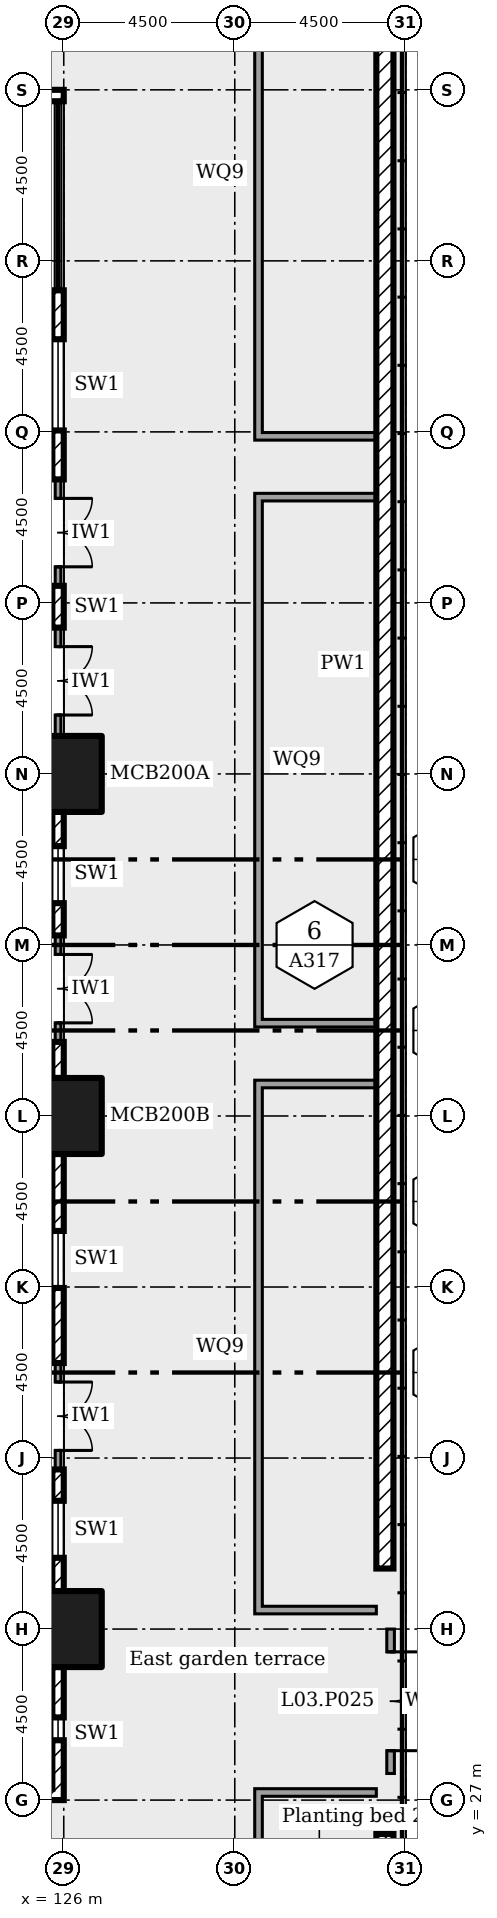
"""IFC4 building model, lengths in metres.
Left out: names, types, materials, properties, quantities, classifications, styles, units other than length and angle.
Written with IfcOpenShell. Run it as: python <this file> out.ifc"""

import sys

from ifc_helpers import new_model, si_unit, direction, frame, frame_2d, origin, origin_2d, place, context, subcontext, project, spatial, rectangle, extrude, element, fill, save


model = new_model("IFC4")
c1 = context("Model", 3, precision=1e-05, world=origin(), true_north=direction((0.0, 1.0)))
c2 = subcontext(c1, "Body", "Model", "MODEL_VIEW")
j1 = project(units=[si_unit("LENGTHUNIT", "METRE"), si_unit("PLANEANGLEUNIT", "RADIAN")], contexts=[c1])
p1 = place(None, origin())
s1 = spatial("IfcSite", under=j1, at=p1, CompositionType="ELEMENT")
p2 = place(p1, origin())
s2 = spatial("IfcBuilding", under=s1, at=p2, CompositionType="ELEMENT")
p3 = place(p2, frame((0.0, 0.0, 16.5)))
s3 = spatial("IfcBuildingStorey", under=s2, at=p3, CompositionType="ELEMENT", Elevation=16.5)
for number, where in (
    (1, (126.0, 31.5, 0.0)),
    (2, (126.0, 45.0, 0.0)),
    (3, (126.0, 54.0, 0.0)),
):
    element("IfcColumn", number, at=place(p3, frame(where)), inside=s3, PredefinedType="COLUMN", context=c2, shape_type="SweptSolid", body=[
        extrude(rectangle(XDim=2.0, YDim=2.0, at=origin_2d()), origin(), (0.0, 0.0, 1.0), 4.5),
    ])
p4 = place(p3, frame((122.5, 27.15, 0.0)))
e4 = element("IfcWall", 4, at=p4, inside=s3, PredefinedType="ELEMENTEDWALL", context=c2, shape_type="SweptSolid", body=[
    extrude(rectangle(XDim=3.2, YDim=0.3, at=frame_2d((1.6, 0.0))), origin(), (0.0, 0.0, 1.0), 4.05),
])
p5 = place(p4, frame((1.475, 0.0, 0.45)))
e5 = element("IfcOpeningElement", 5, at=p5, cuts=e4, PredefinedType="OPENING", context=c2, shape_type="SweptSolid", body=[
    extrude(rectangle(XDim=0.6, YDim=2.4, at=frame_2d((0.3, 1.2))), frame((0.0, 0.16, 0.0), z_axis=(0.0, -1.0, 0.0), x_axis=(1.0, 0.0, 0.0)), (0.0, 0.0, 1.0), 0.32),
])
p6 = place(p3, frame((125.85, 27.0, 0.0), z_axis=(0.0, 0.0, 1.0), x_axis=(0.0, 1.0, 0.0)))
e6 = element("IfcWall", 6, at=p6, inside=s3, PredefinedType="ELEMENTEDWALL", context=c2, shape_type="SweptSolid", body=[
    extrude(rectangle(XDim=3.5, YDim=0.3, at=frame_2d((1.75, 0.0))), origin(), (0.0, 0.0, 1.0), 4.05),
])
p7 = place(p6, frame((1.575, 0.0, 0.45)))
e7 = element("IfcOpeningElement", 7, at=p7, cuts=e6, PredefinedType="OPENING", context=c2, shape_type="SweptSolid", body=[
    extrude(rectangle(XDim=0.6, YDim=2.4, at=frame_2d((0.3, 1.2))), frame((0.0, 0.16, 0.0), z_axis=(0.0, -1.0, 0.0), x_axis=(1.0, 0.0, 0.0)), (0.0, 0.0, 1.0), 0.32),
])
p8 = place(p3, frame((125.85, 32.5, 0.0), z_axis=(0.0, 0.0, 1.0), x_axis=(0.0, 1.0, 0.0)))
e8 = element("IfcWall", 8, at=p8, inside=s3, PredefinedType="ELEMENTEDWALL", context=c2, shape_type="SweptSolid", body=[
    extrude(rectangle(XDim=3.2, YDim=0.3, at=frame_2d((1.6, 0.0))), origin(), (0.0, 0.0, 1.0), 2.25),
])
p9 = place(p8, frame((0.875, 0.0, 0.9)))
e9 = element("IfcOpeningElement", 9, at=p9, cuts=e8, PredefinedType="OPENING", context=c2, shape_type="SweptSolid", body=[
    extrude(rectangle(XDim=1.5, YDim=1.25, at=frame_2d((0.75, 0.625))), frame((0.0, 0.16, 0.0), z_axis=(0.0, -1.0, 0.0), x_axis=(1.0, 0.0, 0.0)), (0.0, 0.0, 1.0), 0.32),
])
p10 = place(p3, frame((125.85, 35.7, 0.0), z_axis=(0.0, 0.0, 1.0), x_axis=(0.0, 1.0, 0.0)))
e10 = element("IfcWall", 10, at=p10, inside=s3, PredefinedType="SOLIDWALL", context=c2, shape_type="SweptSolid", body=[
    extrude(rectangle(XDim=2.8, YDim=0.15, at=frame_2d((1.4, 0.0))), origin(), (0.0, 0.0, 1.0), 2.25),
])
p11 = place(p10, frame((0.5, 0.0, 0.0)))
e11 = element("IfcOpeningElement", 11, at=p11, cuts=e10, PredefinedType="OPENING", context=c2, shape_type="SweptSolid", body=[
    extrude(rectangle(XDim=1.8, YDim=2.1, at=frame_2d((0.9, 1.05))), frame((0.0, 0.085, 0.0), z_axis=(0.0, -1.0, 0.0), x_axis=(1.0, 0.0, 0.0)), (0.0, 0.0, 1.0), 0.17),
])
p12 = place(p3, frame((125.85, 38.5, 0.0), z_axis=(0.0, 0.0, 1.0), x_axis=(0.0, 1.0, 0.0)))
e12 = element("IfcWall", 12, at=p12, inside=s3, PredefinedType="ELEMENTEDWALL", context=c2, shape_type="SweptSolid", body=[
    extrude(rectangle(XDim=5.5, YDim=0.3, at=frame_2d((2.75, 0.0))), origin(), (0.0, 0.0, 1.0), 2.25),
])
p13 = place(p12, frame((1.975, 0.0, 0.9)))
e13 = element("IfcOpeningElement", 13, at=p13, cuts=e12, PredefinedType="OPENING", context=c2, shape_type="SweptSolid", body=[
    extrude(rectangle(XDim=1.5, YDim=1.25, at=frame_2d((0.75, 0.625))), frame((0.0, 0.16, 0.0), z_axis=(0.0, -1.0, 0.0), x_axis=(1.0, 0.0, 0.0)), (0.0, 0.0, 1.0), 0.32),
])
p14 = place(p3, frame((125.85, 46.0, 0.0), z_axis=(0.0, 0.0, 1.0), x_axis=(0.0, 1.0, 0.0)))
e14 = element("IfcWall", 14, at=p14, inside=s3, PredefinedType="ELEMENTEDWALL", context=c2, shape_type="SweptSolid", body=[
    extrude(rectangle(XDim=0.95, YDim=0.3, at=frame_2d((0.475, 0.0))), origin(), (0.0, 0.0, 1.0), 2.25),
])
p15 = place(p3, frame((125.85, 46.95, 0.0), z_axis=(0.0, 0.0, 1.0), x_axis=(0.0, 1.0, 0.0)))
e15 = element("IfcWall", 15, at=p15, inside=s3, PredefinedType="SOLIDWALL", context=c2, shape_type="SweptSolid", body=[
    extrude(rectangle(XDim=2.8, YDim=0.15, at=frame_2d((1.4, 0.0))), origin(), (0.0, 0.0, 1.0), 2.25),
])
p16 = place(p15, frame((0.5, 0.0, 0.0)))
e16 = element("IfcOpeningElement", 16, at=p16, cuts=e15, PredefinedType="OPENING", context=c2, shape_type="SweptSolid", body=[
    extrude(rectangle(XDim=1.8, YDim=2.1, at=frame_2d((0.9, 1.05))), frame((0.0, 0.085, 0.0), z_axis=(0.0, -1.0, 0.0), x_axis=(1.0, 0.0, 0.0)), (0.0, 0.0, 1.0), 0.17),
])
p17 = place(p3, frame((125.85, 49.75, 0.0), z_axis=(0.0, 0.0, 1.0), x_axis=(0.0, 1.0, 0.0)))
e17 = element("IfcWall", 17, at=p17, inside=s3, PredefinedType="ELEMENTEDWALL", context=c2, shape_type="SweptSolid", body=[
    extrude(rectangle(XDim=3.25, YDim=0.3, at=frame_2d((1.625, 0.0))), origin(), (0.0, 0.0, 1.0), 2.25),
])
p18 = place(p17, frame((0.85, 0.0, 0.9)))
e18 = element("IfcOpeningElement", 18, at=p18, cuts=e17, PredefinedType="OPENING", context=c2, shape_type="SweptSolid", body=[
    extrude(rectangle(XDim=1.5, YDim=1.25, at=frame_2d((0.75, 0.625))), frame((0.0, 0.16, 0.0), z_axis=(0.0, -1.0, 0.0), x_axis=(1.0, 0.0, 0.0)), (0.0, 0.0, 1.0), 0.32),
])
p19 = place(p3, frame((125.85, 55.0, 0.0), z_axis=(0.0, 0.0, 1.0), x_axis=(0.0, 1.0, 0.0)))
e19 = element("IfcWall", 19, at=p19, inside=s3, PredefinedType="SOLIDWALL", context=c2, shape_type="SweptSolid", body=[
    extrude(rectangle(XDim=2.85, YDim=0.15, at=frame_2d((1.425, 0.0))), origin(), (0.0, 0.0, 1.0), 4.05),
])
p20 = place(p19, frame((0.55, 0.0, 0.0)))
e20 = element("IfcOpeningElement", 20, at=p20, cuts=e19, PredefinedType="OPENING", context=c2, shape_type="SweptSolid", body=[
    extrude(rectangle(XDim=1.8, YDim=2.4, at=frame_2d((0.9, 1.2))), frame((0.0, 0.085, 0.0), z_axis=(0.0, -1.0, 0.0), x_axis=(1.0, 0.0, 0.0)), (0.0, 0.0, 1.0), 0.17),
])
p21 = place(p3, frame((125.85, 57.85, 0.0), z_axis=(0.0, 0.0, 1.0), x_axis=(0.0, 1.0, 0.0)))
e21 = element("IfcWall", 21, at=p21, inside=s3, PredefinedType="ELEMENTEDWALL", context=c2, shape_type="SweptSolid", body=[
    extrude(rectangle(XDim=1.1, YDim=0.3, at=frame_2d((0.55, 0.0))), origin(), (0.0, 0.0, 1.0), 4.05),
])
p22 = place(p3, frame((125.85, 58.95, 0.0), z_axis=(0.0, 0.0, 1.0), x_axis=(0.0, 1.0, 0.0)))
e22 = element("IfcWall", 22, at=p22, inside=s3, PredefinedType="SOLIDWALL", context=c2, shape_type="SweptSolid", body=[
    extrude(rectangle(XDim=2.8, YDim=0.15, at=frame_2d((1.4, 0.0))), origin(), (0.0, 0.0, 1.0), 4.05),
])
p23 = place(p22, frame((0.5, 0.0, 0.0)))
e23 = element("IfcOpeningElement", 23, at=p23, cuts=e22, PredefinedType="OPENING", context=c2, shape_type="SweptSolid", body=[
    extrude(rectangle(XDim=1.8, YDim=2.4, at=frame_2d((0.9, 1.2))), frame((0.0, 0.085, 0.0), z_axis=(0.0, -1.0, 0.0), x_axis=(1.0, 0.0, 0.0)), (0.0, 0.0, 1.0), 0.17),
])
p24 = place(p3, frame((125.85, 61.75, 0.0), z_axis=(0.0, 0.0, 1.0), x_axis=(0.0, 1.0, 0.0)))
e24 = element("IfcWall", 24, at=p24, inside=s3, PredefinedType="ELEMENTEDWALL", context=c2, shape_type="SweptSolid", body=[
    extrude(rectangle(XDim=4.975, YDim=0.3, at=frame_2d((2.488, 0.0))), origin(), (0.0, 0.0, 1.0), 4.05),
])
p25 = place(p24, frame((1.288, 0.0, 0.45)))
e25 = element("IfcOpeningElement", 25, at=p25, cuts=e24, PredefinedType="OPENING", context=c2, shape_type="SweptSolid", body=[
    extrude(rectangle(XDim=2.4, YDim=2.4, at=frame_2d((1.2, 1.2))), frame((0.0, 0.16, 0.0), z_axis=(0.0, -1.0, 0.0), x_axis=(1.0, 0.0, 0.0)), (0.0, 0.0, 1.0), 0.32),
])
p26 = place(p3, frame((126.0, 71.85, 0.0), z_axis=(0.0, 0.0, 1.0), x_axis=(-1.0, 0.0, 0.0)))
e26 = element("IfcWall", 26, at=p26, inside=s3, PredefinedType="ELEMENTEDWALL", context=c2, shape_type="SweptSolid", body=[
    extrude(rectangle(XDim=6.7, YDim=0.3, at=frame_2d((3.35, 0.0))), origin(), (0.0, 0.0, 1.0), 4.05),
])
p27 = place(p26, frame((2.15, 0.0, 0.45)))
e27 = element("IfcOpeningElement", 27, at=p27, cuts=e26, PredefinedType="OPENING", context=c2, shape_type="SweptSolid", body=[
    extrude(rectangle(XDim=2.4, YDim=2.4, at=frame_2d((1.2, 1.2))), frame((0.0, 0.16, 0.0), z_axis=(0.0, -1.0, 0.0), x_axis=(1.0, 0.0, 0.0)), (0.0, 0.0, 1.0), 0.32),
])
p28 = place(p3, frame((134.45, 18.775, 0.0), z_axis=(0.0, 0.0, 1.0), x_axis=(0.0, 1.0, 0.0)))
e28 = element("IfcWall", 28, at=p28, inside=s3, PredefinedType="SOLIDWALL", context=c2, shape_type="SweptSolid", body=[
    extrude(rectangle(XDim=7.333, YDim=0.45, at=frame_2d((3.666, 0.0))), origin(), (0.0, 0.0, 1.0), 0.6),
])
p29 = place(p3, frame((134.45, 33.093, 0.0), z_axis=(0.0, 0.0, 1.0), x_axis=(0.0, 1.0, 0.0)))
e29 = element("IfcWall", 29, at=p29, inside=s3, PredefinedType="SOLIDWALL", context=c2, shape_type="SweptSolid", body=[
    extrude(rectangle(XDim=47.583, YDim=0.45, at=frame_2d((23.791, 0.0))), origin(), (0.0, 0.0, 1.0), 0.6),
])
p30 = place(p3, frame((131.025, 27.2, 0.0)))
e30 = element("IfcWall", 30, at=p30, inside=s3, PredefinedType="SOLIDWALL", context=c2, shape_type="SweptSolid", body=[
    extrude(rectangle(XDim=3.2, YDim=0.2, at=frame_2d((1.6, 0.0))), origin(), (0.0, 0.0, 1.0), 0.45),
])
p31 = place(p3, frame((131.125, 22.375, 0.0), z_axis=(0.0, 0.0, 1.0), x_axis=(0.0, 1.0, 0.0)))
e31 = element("IfcWall", 31, at=p31, inside=s3, PredefinedType="SOLIDWALL", context=c2, shape_type="SweptSolid", body=[
    extrude(rectangle(XDim=4.725, YDim=0.2, at=frame_2d((2.363, 0.0))), origin(), (0.0, 0.0, 1.0), 0.45),
])
for number, where in (
    (32, (131.025, 45.842, 0.0)),
    (33, (131.025, 32.0, 0.0)),
):
    element("IfcWall", number, at=place(p3, frame(where)), inside=s3, PredefinedType="SOLIDWALL", context=c2, shape_type="SweptSolid", body=[
        extrude(rectangle(XDim=3.2, YDim=0.2, at=frame_2d((1.6, 0.0))), origin(), (0.0, 0.0, 1.0), 0.45),
    ])
p32 = place(p3, frame((131.125, 32.1, 0.0), z_axis=(0.0, 0.0, 1.0), x_axis=(0.0, 1.0, 0.0)))
e34 = element("IfcWall", 34, at=p32, inside=s3, PredefinedType="SOLIDWALL", context=c2, shape_type="SweptSolid", body=[
    extrude(rectangle(XDim=13.642, YDim=0.2, at=frame_2d((6.821, 0.0))), origin(), (0.0, 0.0, 1.0), 0.45),
])
for number, where in (
    (35, (131.025, 61.283, 0.0)),
    (36, (131.025, 47.442, 0.0)),
):
    element("IfcWall", number, at=place(p3, frame(where)), inside=s3, PredefinedType="SOLIDWALL", context=c2, shape_type="SweptSolid", body=[
        extrude(rectangle(XDim=3.2, YDim=0.2, at=frame_2d((1.6, 0.0))), origin(), (0.0, 0.0, 1.0), 0.45),
    ])
p33 = place(p3, frame((131.125, 47.542, 0.0), z_axis=(0.0, 0.0, 1.0), x_axis=(0.0, 1.0, 0.0)))
e37 = element("IfcWall", 37, at=p33, inside=s3, PredefinedType="SOLIDWALL", context=c2, shape_type="SweptSolid", body=[
    extrude(rectangle(XDim=13.642, YDim=0.2, at=frame_2d((6.821, 0.0))), origin(), (0.0, 0.0, 1.0), 0.45),
])
p34 = place(p3, frame((131.025, 62.883, 0.0)))
e38 = element("IfcWall", 38, at=p34, inside=s3, PredefinedType="SOLIDWALL", context=c2, shape_type="SweptSolid", body=[
    extrude(rectangle(XDim=3.2, YDim=0.2, at=frame_2d((1.6, 0.0))), origin(), (0.0, 0.0, 1.0), 0.45),
])
p35 = place(p3, frame((131.125, 62.983, 0.0), z_axis=(0.0, 0.0, 1.0), x_axis=(0.0, 1.0, 0.0)))
e39 = element("IfcWall", 39, at=p35, inside=s3, PredefinedType="SOLIDWALL", context=c2, shape_type="SweptSolid", body=[
    extrude(rectangle(XDim=13.642, YDim=0.2, at=frame_2d((6.821, 0.0))), origin(), (0.0, 0.0, 1.0), 0.45),
])
p36 = place(p3, frame((122.495, 58.5, 0.0)))
e40 = element("IfcWall", 40, at=p36, inside=s3, PredefinedType="PARTITIONING", context=c2, shape_type="SweptSolid", body=[
    extrude(rectangle(XDim=3.205, YDim=0.15, at=frame_2d((1.603, 0.0))), origin(), (0.0, 0.0, 1.0), 4.05),
])
p37 = place(p3, frame((134.6, 27.7, 0.0), z_axis=(0.0, 0.0, 1.0), x_axis=(0.0, 1.0, 0.0)))
e41 = element("IfcWall", 41, at=p37, inside=s3, PredefinedType="SOLIDWALL", context=c2, shape_type="SweptSolid", body=[
    extrude(rectangle(XDim=3.8, YDim=0.2, at=frame_2d((1.9, 0.0))), origin(), (0.0, 0.0, 1.0), 2.3),
])
p38 = place(p37, frame((0.6, 0.0, 0.0)))
e42 = element("IfcOpeningElement", 42, at=p38, cuts=e41, PredefinedType="OPENING", context=c2, shape_type="SweptSolid", body=[
    extrude(rectangle(XDim=2.6, YDim=2.1, at=frame_2d((1.3, 1.05))), frame((0.0, 0.11, 0.0), z_axis=(0.0, -1.0, 0.0), x_axis=(1.0, 0.0, 0.0)), (0.0, 0.0, 1.0), 0.22),
])
p39 = place(p7, origin())
e43 = element("IfcWindow", 43, at=p39, inside=s3, PartitioningType="SINGLE_PANEL", PredefinedType="WINDOW", context=c2, shape_type="SweptSolid", body=[
    extrude(rectangle(XDim=0.6, YDim=2.4, at=frame_2d((0.3, 1.2))), frame((0.0, 0.03, 0.0), z_axis=(0.0, -1.0, 0.0), x_axis=(1.0, 0.0, 0.0)), (0.0, 0.0, 1.0), 0.06),
])
fill(e7, e43)
p40 = place(p9, origin())
e44 = element("IfcWindow", 44, at=p40, inside=s3, PartitioningType="SINGLE_PANEL", PredefinedType="WINDOW", context=c2, shape_type="SweptSolid", body=[
    extrude(rectangle(XDim=1.5, YDim=1.25, at=frame_2d((0.75, 0.625))), frame((0.0, 0.03, 0.0), z_axis=(0.0, -1.0, 0.0), x_axis=(1.0, 0.0, 0.0)), (0.0, 0.0, 1.0), 0.06),
])
fill(e9, e44)
p41 = place(p11, frame((1.8, 0.0, 0.0), x_axis=(-1.0, 0.0, 0.0)))
e45 = element("IfcDoor", 45, at=p41, inside=s3, OperationType="DOUBLE_DOOR_DOUBLE_SWING", PredefinedType="NOTDEFINED", context=c2, shape_type="SweptSolid", body=[
    extrude(rectangle(XDim=1.8, YDim=2.1, at=frame_2d((0.9, 1.05))), frame((0.0, 0.025, 0.0), z_axis=(0.0, -1.0, 0.0), x_axis=(1.0, 0.0, 0.0)), (0.0, 0.0, 1.0), 0.05),
])
fill(e11, e45)
p42 = place(p13, origin())
e46 = element("IfcWindow", 46, at=p42, inside=s3, PartitioningType="SINGLE_PANEL", PredefinedType="WINDOW", context=c2, shape_type="SweptSolid", body=[
    extrude(rectangle(XDim=1.5, YDim=1.25, at=frame_2d((0.75, 0.625))), frame((0.0, 0.03, 0.0), z_axis=(0.0, -1.0, 0.0), x_axis=(1.0, 0.0, 0.0)), (0.0, 0.0, 1.0), 0.06),
])
fill(e13, e46)
p43 = place(p16, frame((1.8, 0.0, 0.0), x_axis=(-1.0, 0.0, 0.0)))
e47 = element("IfcDoor", 47, at=p43, inside=s3, OperationType="DOUBLE_DOOR_DOUBLE_SWING", PredefinedType="NOTDEFINED", context=c2, shape_type="SweptSolid", body=[
    extrude(rectangle(XDim=1.8, YDim=2.1, at=frame_2d((0.9, 1.05))), frame((0.0, 0.025, 0.0), z_axis=(0.0, -1.0, 0.0), x_axis=(1.0, 0.0, 0.0)), (0.0, 0.0, 1.0), 0.05),
])
fill(e16, e47)
p44 = place(p18, origin())
e48 = element("IfcWindow", 48, at=p44, inside=s3, PartitioningType="SINGLE_PANEL", PredefinedType="WINDOW", context=c2, shape_type="SweptSolid", body=[
    extrude(rectangle(XDim=1.5, YDim=1.25, at=frame_2d((0.75, 0.625))), frame((0.0, 0.03, 0.0), z_axis=(0.0, -1.0, 0.0), x_axis=(1.0, 0.0, 0.0)), (0.0, 0.0, 1.0), 0.06),
])
fill(e18, e48)
p45 = place(p20, frame((1.8, 0.0, 0.0), x_axis=(-1.0, 0.0, 0.0)))
e49 = element("IfcDoor", 49, at=p45, inside=s3, OperationType="DOUBLE_DOOR_DOUBLE_SWING", PredefinedType="NOTDEFINED", context=c2, shape_type="SweptSolid", body=[
    extrude(rectangle(XDim=1.8, YDim=2.4, at=frame_2d((0.9, 1.2))), frame((0.0, 0.025, 0.0), z_axis=(0.0, -1.0, 0.0), x_axis=(1.0, 0.0, 0.0)), (0.0, 0.0, 1.0), 0.05),
])
fill(e20, e49)
p46 = place(p23, frame((1.8, 0.0, 0.0), x_axis=(-1.0, 0.0, 0.0)))
e50 = element("IfcDoor", 50, at=p46, inside=s3, OperationType="DOUBLE_DOOR_DOUBLE_SWING", PredefinedType="NOTDEFINED", context=c2, shape_type="SweptSolid", body=[
    extrude(rectangle(XDim=1.8, YDim=2.4, at=frame_2d((0.9, 1.2))), frame((0.0, 0.025, 0.0), z_axis=(0.0, -1.0, 0.0), x_axis=(1.0, 0.0, 0.0)), (0.0, 0.0, 1.0), 0.05),
])
fill(e23, e50)
p47 = place(p25, origin())
e51 = element("IfcWindow", 51, at=p47, inside=s3, PartitioningType="SINGLE_PANEL", PredefinedType="WINDOW", context=c2, shape_type="SweptSolid", body=[
    extrude(rectangle(XDim=2.4, YDim=2.4, at=frame_2d((1.2, 1.2))), frame((0.0, 0.03, 0.0), z_axis=(0.0, -1.0, 0.0), x_axis=(1.0, 0.0, 0.0)), (0.0, 0.0, 1.0), 0.06),
])
fill(e25, e51)
p48 = place(p38, frame((2.6, 0.0, 0.0), x_axis=(-1.0, 0.0, 0.0)))
e52 = element("IfcDoor", 52, at=p48, inside=s3, OperationType="DOUBLE_DOOR_SINGLE_SWING", PredefinedType="GATE", context=c2, shape_type="SweptSolid", body=[
    extrude(rectangle(XDim=2.6, YDim=2.1, at=frame_2d((1.3, 1.05))), frame((0.0, 0.025, 0.0), z_axis=(0.0, -1.0, 0.0), x_axis=(1.0, 0.0, 0.0)), (0.0, 0.0, 1.0), 0.05),
])
fill(e42, e52)
save(model, sys.argv[1])
